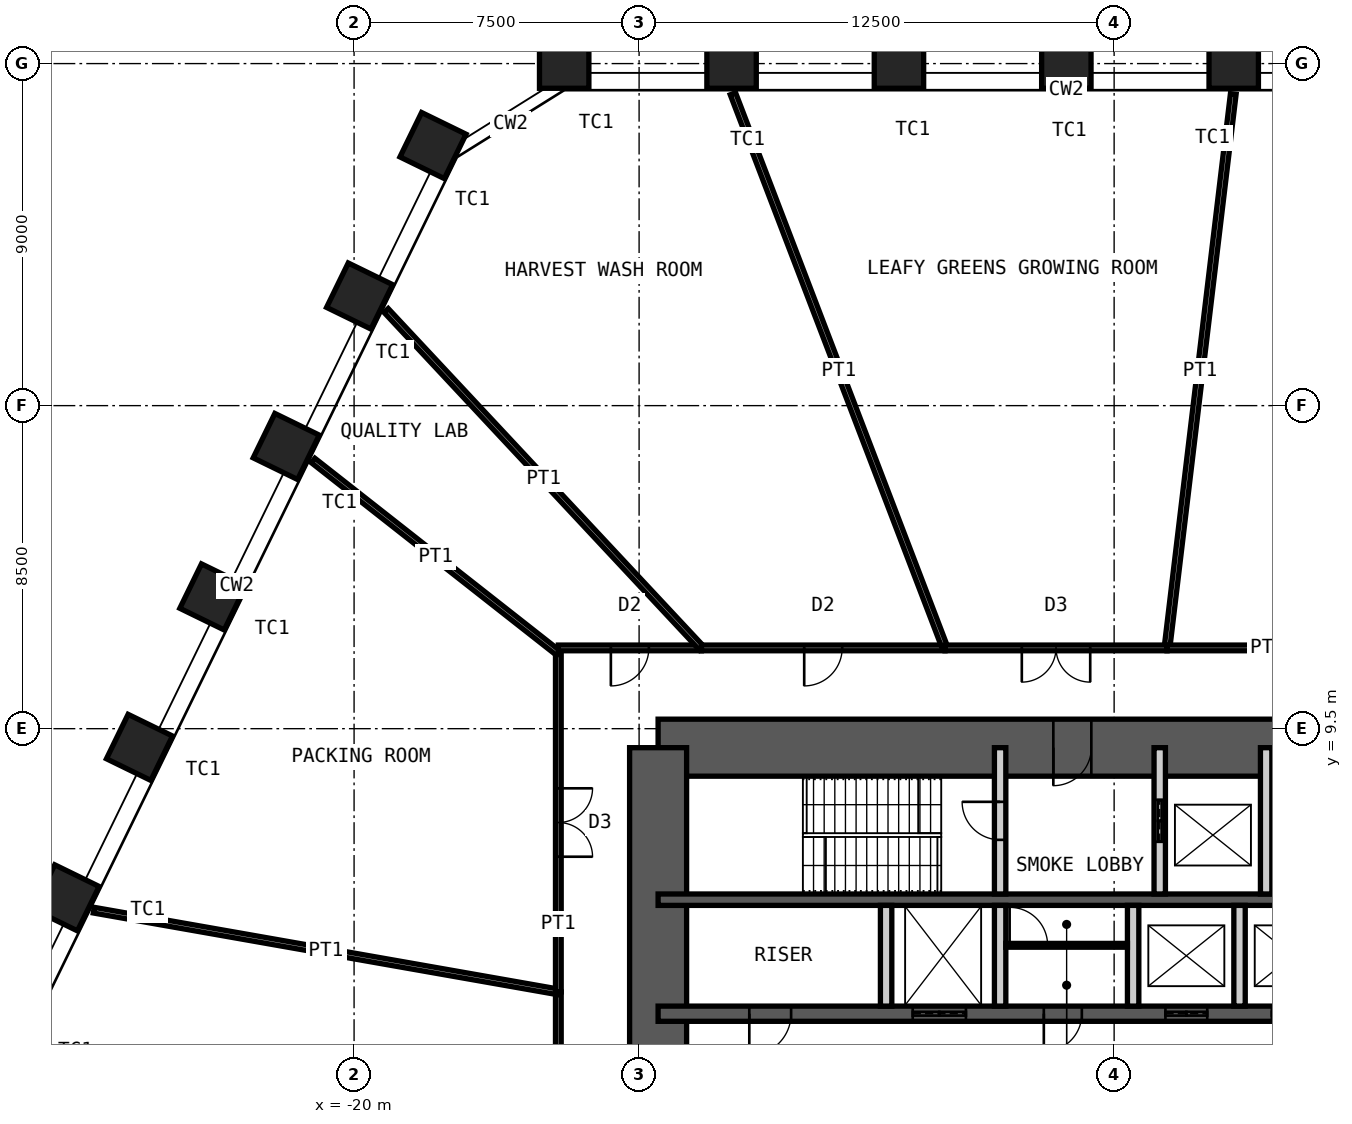
"""IFC4 building model, lengths in metres.
Left out: names, types, materials, properties, quantities, classifications, styles, units other than length and angle.
Written with IfcOpenShell. Run it as: python <this file> out.ifc"""

import sys

from ifc_helpers import new_model, si_unit, direction, frame, frame_2d, origin, origin_2d, place, context, subcontext, project, spatial, rectangle, hollow_rectangle, extrude, element, fill, save


model = new_model("IFC4")
c1 = context("Model", 3, precision=1e-05, world=origin(), true_north=direction((0.0, 1.0)))
c2 = subcontext(c1, "Body", "Model", "MODEL_VIEW")
j1 = project(units=[si_unit("LENGTHUNIT", "METRE"), si_unit("PLANEANGLEUNIT", "RADIAN")], contexts=[c1])
p1 = place(None, origin())
s1 = spatial("IfcSite", under=j1, at=p1, CompositionType="ELEMENT")
p2 = place(p1, origin())
s2 = spatial("IfcBuilding", under=s1, at=p2, CompositionType="ELEMENT")
p3 = place(p2, frame((0.0, 0.0, 47.0)))
s3 = spatial("IfcBuildingStorey", under=s2, at=p3, CompositionType="ELEMENT", Elevation=47.0)
for number, where, z_axis, x_axis in (
    (1, (-14.471, 27.0, 0.0), (0.0, 0.0, 1.0), (-1.0, 0.0, 0.0)),
    (2, (-10.067, 27.0, 0.0), (0.0, 0.0, 1.0), (-1.0, 0.0, 0.0)),
    (3, (-5.662, 27.0, 0.0), (0.0, 0.0, 1.0), (-1.0, 0.0, 0.0)),
    (4, (-1.258, 27.0, 0.0), (0.0, 0.0, 1.0), (-1.0, 0.0, 0.0)),
    (5, (3.147, 27.0, 0.0), (0.0, 0.0, 1.0), (-1.0, 0.0, 0.0)),
    (6, (-27.578, 5.049, 0.0), (0.0, 0.0, 1.0), (-0.438, -0.899, 0.0)),
    (7, (-25.647, 9.008, 0.0), (0.0, 0.0, 1.0), (-0.438, -0.899, 0.0)),
    (8, (-23.716, 12.966, 0.0), (0.0, 0.0, 1.0), (-0.438, -0.899, 0.0)),
    (9, (-21.785, 16.925, 0.0), (0.0, 0.0, 1.0), (-0.438, -0.899, 0.0)),
    (10, (-19.854, 20.884, 0.0), (0.0, 0.0, 1.0), (-0.438, -0.899, 0.0)),
    (11, (-17.924, 24.843, 0.0), (0.0, 0.0, 1.0), (-0.438, -0.899, 0.0)),
):
    element("IfcColumn", number, at=place(p3, frame(where, z_axis=z_axis, x_axis=x_axis)), inside=s3, PredefinedType="COLUMN", context=c2, shape_type="SweptSolid", body=[
        extrude(hollow_rectangle(XDim=1.3, YDim=1.3, WallThickness=0.1, at=origin_2d()), origin(), (0.0, 0.0, 1.0), 5.0),
    ])
p4 = place(p3, frame((-12.0, 9.0, 0.0), z_axis=(0.0, 0.0, 1.0), x_axis=(1.0, 0.0, 0.0)))
e12 = element("IfcWall", 12, at=p4, inside=s3, PredefinedType="SHEAR", context=c2, shape_type="SweptSolid", body=[
    extrude(rectangle(XDim=24.0, YDim=1.5, at=frame_2d((12.0, 0.0))), origin(), (0.0, 0.0, 1.0), 5.0),
])
p5 = place(p4, frame((10.4, 0.0, 0.0)))
e13 = element("IfcOpeningElement", 13, at=p5, cuts=e12, PredefinedType="OPENING", context=c2, shape_type="SweptSolid", body=[
    extrude(rectangle(XDim=1.0, YDim=2.1, at=frame_2d((0.5, 1.05))), frame((0.0, 0.76, 0.0), z_axis=(0.0, -1.0, 0.0), x_axis=(1.0, 0.0, 0.0)), (0.0, 0.0, 1.0), 1.52),
])
p6 = place(p4, frame((17.6, 0.0, 0.0)))
e14 = element("IfcOpeningElement", 14, at=p6, cuts=e12, PredefinedType="OPENING", context=c2, shape_type="SweptSolid", body=[
    extrude(rectangle(XDim=0.9, YDim=2.1, at=frame_2d((0.45, 1.05))), frame((0.0, 0.76, 0.0), z_axis=(0.0, -1.0, 0.0), x_axis=(1.0, 0.0, 0.0)), (0.0, 0.0, 1.0), 1.52),
])
p7 = place(p4, frame((21.9, 0.0, 0.0)))
e15 = element("IfcOpeningElement", 15, at=p7, cuts=e12, PredefinedType="OPENING", context=c2, shape_type="SweptSolid", body=[
    extrude(rectangle(XDim=0.9, YDim=2.1, at=frame_2d((0.45, 1.05))), frame((0.0, 0.76, 0.0), z_axis=(0.0, -1.0, 0.0), x_axis=(1.0, 0.0, 0.0)), (0.0, 0.0, 1.0), 1.52),
])
p8 = place(p3, frame((-12.0, -9.0, 0.0), z_axis=(0.0, 0.0, 1.0), x_axis=(0.0, 1.0, 0.0)))
e16 = element("IfcWall", 16, at=p8, inside=s3, PredefinedType="SHEAR", context=c2, shape_type="SweptSolid", body=[
    extrude(rectangle(XDim=18.0, YDim=1.5, at=frame_2d((9.0, 0.0))), origin(), (0.0, 0.0, 1.0), 5.0),
])
p9 = place(p8, frame((8.1, 0.0, 0.0)))
e17 = element("IfcOpeningElement", 17, at=p9, cuts=e16, PredefinedType="OPENING", context=c2, shape_type="SweptSolid", body=[
    extrude(rectangle(XDim=1.8, YDim=2.1, at=frame_2d((0.9, 1.05))), frame((0.0, 0.76, 0.0), z_axis=(0.0, -1.0, 0.0), x_axis=(1.0, 0.0, 0.0)), (0.0, 0.0, 1.0), 1.52),
])
p10 = place(p3, frame((-12.0, 5.0, 0.0), z_axis=(0.0, 0.0, 1.0), x_axis=(1.0, 0.0, 0.0)))
e18 = element("IfcWall", 18, at=p10, inside=s3, PredefinedType="SHEAR", context=c2, shape_type="SweptSolid", body=[
    extrude(rectangle(XDim=24.0, YDim=0.3, at=frame_2d((12.0, 0.0))), origin(), (0.0, 0.0, 1.0), 5.0),
])
p11 = place(p3, frame((-12.0, 2.0, 0.0), z_axis=(0.0, 0.0, 1.0), x_axis=(1.0, 0.0, 0.0)))
e19 = element("IfcWall", 19, at=p11, inside=s3, PredefinedType="SHEAR", context=c2, shape_type="SweptSolid", body=[
    extrude(rectangle(XDim=24.0, YDim=0.4, at=frame_2d((12.0, 0.0))), origin(), (0.0, 0.0, 1.0), 5.0),
])
p12 = place(p11, frame((2.4, 0.0, 0.0)))
e20 = element("IfcOpeningElement", 20, at=p12, cuts=e19, PredefinedType="OPENING", context=c2, shape_type="SweptSolid", body=[
    extrude(rectangle(XDim=1.1, YDim=2.1, at=frame_2d((0.55, 1.05))), frame((0.0, 0.21, 0.0), z_axis=(0.0, -1.0, 0.0), x_axis=(1.0, 0.0, 0.0)), (0.0, 0.0, 1.0), 0.42),
])
p13 = place(p11, frame((22.0, 0.0, 0.0)))
e21 = element("IfcOpeningElement", 21, at=p13, cuts=e19, PredefinedType="OPENING", context=c2, shape_type="SweptSolid", body=[
    extrude(rectangle(XDim=1.1, YDim=2.1, at=frame_2d((0.55, 1.05))), frame((0.0, 0.21, 0.0), z_axis=(0.0, -1.0, 0.0), x_axis=(1.0, 0.0, 0.0)), (0.0, 0.0, 1.0), 0.42),
])
p14 = place(p11, frame((10.15, 0.0, 0.0)))
e22 = element("IfcOpeningElement", 22, at=p14, cuts=e19, PredefinedType="OPENING", context=c2, shape_type="SweptSolid", body=[
    extrude(rectangle(XDim=1.0, YDim=2.1, at=frame_2d((0.5, 1.05))), frame((0.0, 0.21, 0.0), z_axis=(0.0, -1.0, 0.0), x_axis=(1.0, 0.0, 0.0)), (0.0, 0.0, 1.0), 0.42),
])
p15 = place(p11, frame((6.7, 0.0, 0.0)))
e23 = element("IfcOpeningElement", 23, at=p15, cuts=e19, PredefinedType="OPENING", context=c2, shape_type="SweptSolid", body=[
    extrude(rectangle(XDim=1.4, YDim=2.4, at=frame_2d((0.7, 1.2))), frame((0.0, 0.21, 0.0), z_axis=(0.0, -1.0, 0.0), x_axis=(1.0, 0.0, 0.0)), (0.0, 0.0, 1.0), 0.42),
])
p16 = place(p11, frame((13.35, 0.0, 0.0)))
e24 = element("IfcOpeningElement", 24, at=p16, cuts=e19, PredefinedType="OPENING", context=c2, shape_type="SweptSolid", body=[
    extrude(rectangle(XDim=1.1, YDim=2.4, at=frame_2d((0.55, 1.2))), frame((0.0, 0.21, 0.0), z_axis=(0.0, -1.0, 0.0), x_axis=(1.0, 0.0, 0.0)), (0.0, 0.0, 1.0), 0.42),
])
p17 = place(p11, frame((16.15, 0.0, 0.0)))
e25 = element("IfcOpeningElement", 25, at=p17, cuts=e19, PredefinedType="OPENING", context=c2, shape_type="SweptSolid", body=[
    extrude(rectangle(XDim=1.1, YDim=2.4, at=frame_2d((0.55, 1.2))), frame((0.0, 0.21, 0.0), z_axis=(0.0, -1.0, 0.0), x_axis=(1.0, 0.0, 0.0)), (0.0, 0.0, 1.0), 0.42),
])
p18 = place(p11, frame((18.95, 0.0, 0.0)))
e26 = element("IfcOpeningElement", 26, at=p18, cuts=e19, PredefinedType="OPENING", context=c2, shape_type="SweptSolid", body=[
    extrude(rectangle(XDim=1.1, YDim=2.4, at=frame_2d((0.55, 1.2))), frame((0.0, 0.21, 0.0), z_axis=(0.0, -1.0, 0.0), x_axis=(1.0, 0.0, 0.0)), (0.0, 0.0, 1.0), 0.42),
])
p19 = place(p3, frame((-3.0, 5.15, 0.0), z_axis=(0.0, 0.0, 1.0), x_axis=(0.0, 1.0, 0.0)))
e27 = element("IfcWall", 27, at=p19, inside=s3, PredefinedType="PARTITIONING", context=c2, shape_type="SweptSolid", body=[
    extrude(rectangle(XDim=3.85, YDim=0.3, at=frame_2d((1.925, 0.0))), origin(), (0.0, 0.0, 1.0), 4.78),
])
p20 = place(p19, frame((1.425, 0.0, 0.0)))
e28 = element("IfcOpeningElement", 28, at=p20, cuts=e27, PredefinedType="OPENING", context=c2, shape_type="SweptSolid", body=[
    extrude(rectangle(XDim=1.0, YDim=2.1, at=frame_2d((0.5, 1.05))), frame((0.0, 0.16, 0.0), z_axis=(0.0, -1.0, 0.0), x_axis=(1.0, 0.0, 0.0)), (0.0, 0.0, 1.0), 0.32),
])
p21 = place(p3, frame((1.2, 5.15, 0.0), z_axis=(0.0, 0.0, 1.0), x_axis=(0.0, 1.0, 0.0)))
e29 = element("IfcWall", 29, at=p21, inside=s3, PredefinedType="PARTITIONING", context=c2, shape_type="SweptSolid", body=[
    extrude(rectangle(XDim=3.85, YDim=0.3, at=frame_2d((1.925, 0.0))), origin(), (0.0, 0.0, 1.0), 4.78),
])
p22 = place(p21, frame((1.375, 0.0, 0.0)))
e30 = element("IfcOpeningElement", 30, at=p22, cuts=e29, PredefinedType="OPENING", context=c2, shape_type="SweptSolid", body=[
    extrude(rectangle(XDim=1.1, YDim=2.4, at=frame_2d((0.55, 1.2))), frame((0.0, 0.16, 0.0), z_axis=(0.0, -1.0, 0.0), x_axis=(1.0, 0.0, 0.0)), (0.0, 0.0, 1.0), 0.32),
])
p23 = place(p3, frame((4.0, 5.15, 0.0), z_axis=(0.0, 0.0, 1.0), x_axis=(0.0, 1.0, 0.0)))
e31 = element("IfcWall", 31, at=p23, inside=s3, PredefinedType="PARTITIONING", context=c2, shape_type="SweptSolid", body=[
    extrude(rectangle(XDim=3.85, YDim=0.3, at=frame_2d((1.925, 0.0))), origin(), (0.0, 0.0, 1.0), 4.78),
])
for number, where, z_axis, x_axis in (
    (32, (-6.0, 2.2, 0.0), (0.0, 0.0, 1.0), (0.0, 1.0, 0.0)),
    (33, (-3.0, 2.2, 0.0), (0.0, 0.0, 1.0), (0.0, 1.0, 0.0)),
    (34, (0.5, 2.2, 0.0), (0.0, 0.0, 1.0), (0.0, 1.0, 0.0)),
    (35, (3.3, 2.2, 0.0), (0.0, 0.0, 1.0), (0.0, 1.0, 0.0)),
):
    element("IfcWall", number, at=place(p3, frame(where, z_axis=z_axis, x_axis=x_axis)), inside=s3, PredefinedType="PARTITIONING", context=c2, shape_type="SweptSolid", body=[
        extrude(rectangle(XDim=2.65, YDim=0.3, at=frame_2d((1.325, 0.0))), origin(), (0.0, 0.0, 1.0), 4.78),
    ])
p24 = place(p3, frame((-2.85, 3.8, 0.0), z_axis=(0.0, 0.0, 1.0), x_axis=(1.0, 0.0, 0.0)))
e36 = element("IfcWall", 36, at=p24, inside=s3, PredefinedType="PARTITIONING", context=c2, shape_type="SweptSolid", body=[
    extrude(rectangle(XDim=3.2, YDim=0.1, at=frame_2d((1.6, 0.0))), origin(), (0.0, 0.0, 1.0), 4.78),
])
p25 = place(p24, frame((0.1, 0.0, 0.0)))
e37 = element("IfcOpeningElement", 37, at=p25, cuts=e36, PredefinedType="OPENING", context=c2, shape_type="SweptSolid", body=[
    extrude(rectangle(XDim=1.0, YDim=2.4, at=frame_2d((0.5, 1.2))), frame((0.0, 0.06, 0.0), z_axis=(0.0, -1.0, 0.0), x_axis=(1.0, 0.0, 0.0)), (0.0, 0.0, 1.0), 0.12),
])
p26 = place(p3, frame((3.135, 26.201, 0.0), z_axis=(0.0, 0.0, 1.0), x_axis=(-0.118796980211, -0.992918565388, 0.0)))
e38 = element("IfcWall", 38, at=p26, inside=s3, PredefinedType="PARTITIONING", context=c2, shape_type="SweptSolid", body=[
    extrude(rectangle(XDim=14.68, YDim=0.15, at=frame_2d((7.34, 0.0))), origin(), (0.0, 0.0, 1.0), 3.7),
])
p27 = place(p3, frame((1.391, 11.625, 0.0), z_axis=(0.0, 0.0, 1.0), x_axis=(1.0, 0.0, 0.0)))
e39 = element("IfcWall", 39, at=p27, inside=s3, PredefinedType="PARTITIONING", context=c2, shape_type="SweptSolid", body=[
    extrude(rectangle(XDim=13.234, YDim=0.15, at=frame_2d((6.617, 0.0))), origin(), (0.0, 0.0, 1.0), 4.8),
])
p28 = place(p27, frame((5.717, 0.0, 0.0)))
e40 = element("IfcOpeningElement", 40, at=p28, cuts=e39, PredefinedType="OPENING", context=c2, shape_type="SweptSolid", body=[
    extrude(rectangle(XDim=1.8, YDim=2.4, at=frame_2d((0.9, 1.2))), frame((0.0, 0.085, 0.0), z_axis=(0.0, -1.0, 0.0), x_axis=(1.0, 0.0, 0.0)), (0.0, 0.0, 1.0), 0.17),
])
p29 = place(p3, frame((-14.625, -3.641, 0.0), z_axis=(0.0, 0.0, 1.0), x_axis=(0.0, 1.0, 0.0)))
e41 = element("IfcWall", 41, at=p29, inside=s3, PredefinedType="PARTITIONING", context=c2, shape_type="SweptSolid", body=[
    extrude(rectangle(XDim=6.214, YDim=0.15, at=frame_2d((3.107, 0.0))), origin(), (0.0, 0.0, 1.0), 4.8),
])
p30 = place(p29, frame((2.607, 0.0, 0.0)))
e42 = element("IfcOpeningElement", 42, at=p30, cuts=e41, PredefinedType="OPENING", context=c2, shape_type="SweptSolid", body=[
    extrude(rectangle(XDim=1.0, YDim=2.4, at=frame_2d((0.5, 1.2))), frame((0.0, 0.085, 0.0), z_axis=(0.0, -1.0, 0.0), x_axis=(1.0, 0.0, 0.0)), (0.0, 0.0, 1.0), 0.17),
])
p31 = place(p3, frame((-26.85, 4.725, 0.0), z_axis=(0.0, 0.0, 1.0), x_axis=(0.984869569104, -0.173297235559, 0.0)))
e43 = element("IfcWall", 43, at=p31, inside=s3, PredefinedType="PARTITIONING", context=c2, shape_type="SweptSolid", body=[
    extrude(rectangle(XDim=12.413, YDim=0.15, at=frame_2d((6.207, 0.0))), origin(), (0.0, 0.0, 1.0), 3.7),
])
p32 = place(p3, frame((-14.625, 2.573, 0.0), z_axis=(0.0, 0.0, 1.0), x_axis=(0.0, 1.0, 0.0)))
e44 = element("IfcWall", 44, at=p32, inside=s3, PredefinedType="PARTITIONING", context=c2, shape_type="SweptSolid", body=[
    extrude(rectangle(XDim=8.915, YDim=0.15, at=frame_2d((4.457, 0.0))), origin(), (0.0, 0.0, 1.0), 4.8),
])
p33 = place(p32, frame((3.557, 0.0, 0.0)))
e45 = element("IfcOpeningElement", 45, at=p33, cuts=e44, PredefinedType="OPENING", context=c2, shape_type="SweptSolid", body=[
    extrude(rectangle(XDim=1.8, YDim=2.4, at=frame_2d((0.9, 1.2))), frame((0.0, 0.085, 0.0), z_axis=(0.0, -1.0, 0.0), x_axis=(1.0, 0.0, 0.0)), (0.0, 0.0, 1.0), 0.17),
])
p34 = place(p3, frame((-21.077, 16.557, 0.0), z_axis=(0.0, 0.0, 1.0), x_axis=(0.786385446389, -0.617736132752, 0.0)))
e46 = element("IfcWall", 46, at=p34, inside=s3, PredefinedType="PARTITIONING", context=c2, shape_type="SweptSolid", body=[
    extrude(rectangle(XDim=8.205, YDim=0.15, at=frame_2d((4.103, 0.0))), origin(), (0.0, 0.0, 1.0), 3.7),
])
p35 = place(p3, frame((-14.625, 11.625, 0.0), z_axis=(0.0, 0.0, 1.0), x_axis=(1.0, 0.0, 0.0)))
e47 = element("IfcWall", 47, at=p35, inside=s3, PredefinedType="PARTITIONING", context=c2, shape_type="SweptSolid", body=[
    extrude(rectangle(XDim=3.764, YDim=0.15, at=frame_2d((1.882, 0.0))), origin(), (0.0, 0.0, 1.0), 4.8),
])
p36 = place(p35, frame((1.382, 0.0, 0.0)))
e48 = element("IfcOpeningElement", 48, at=p36, cuts=e47, PredefinedType="OPENING", context=c2, shape_type="SweptSolid", body=[
    extrude(rectangle(XDim=1.0, YDim=2.4, at=frame_2d((0.5, 1.2))), frame((0.0, 0.085, 0.0), z_axis=(0.0, -1.0, 0.0), x_axis=(1.0, 0.0, 0.0)), (0.0, 0.0, 1.0), 0.17),
])
p37 = place(p3, frame((-19.157, 20.504, 0.0), z_axis=(0.0, 0.0, 1.0), x_axis=(0.682689688298, -0.73070841619, 0.0)))
e49 = element("IfcWall", 49, at=p37, inside=s3, PredefinedType="PARTITIONING", context=c2, shape_type="SweptSolid", body=[
    extrude(rectangle(XDim=12.151, YDim=0.15, at=frame_2d((6.076, 0.0))), origin(), (0.0, 0.0, 1.0), 3.7),
])
p38 = place(p3, frame((-10.861, 11.625, 0.0), z_axis=(0.0, 0.0, 1.0), x_axis=(1.0, 0.0, 0.0)))
e50 = element("IfcWall", 50, at=p38, inside=s3, PredefinedType="PARTITIONING", context=c2, shape_type="SweptSolid", body=[
    extrude(rectangle(XDim=6.412, YDim=0.15, at=frame_2d((3.206, 0.0))), origin(), (0.0, 0.0, 1.0), 4.8),
])
p39 = place(p38, frame((2.706, 0.0, 0.0)))
e51 = element("IfcOpeningElement", 51, at=p39, cuts=e50, PredefinedType="OPENING", context=c2, shape_type="SweptSolid", body=[
    extrude(rectangle(XDim=1.0, YDim=2.4, at=frame_2d((0.5, 1.2))), frame((0.0, 0.085, 0.0), z_axis=(0.0, -1.0, 0.0), x_axis=(1.0, 0.0, 0.0)), (0.0, 0.0, 1.0), 0.17),
])
p40 = place(p3, frame((-10.031, 26.207, 0.0), z_axis=(0.0, 0.0, 1.0), x_axis=(0.35747288505, -0.933923517454, 0.0)))
e52 = element("IfcWall", 52, at=p40, inside=s3, PredefinedType="PARTITIONING", context=c2, shape_type="SweptSolid", body=[
    extrude(rectangle(XDim=15.613, YDim=0.15, at=frame_2d((7.807, 0.0))), origin(), (0.0, 0.0, 1.0), 3.7),
])
p41 = place(p3, frame((-4.45, 11.625, 0.0), z_axis=(0.0, 0.0, 1.0), x_axis=(1.0, 0.0, 0.0)))
e53 = element("IfcWall", 53, at=p41, inside=s3, PredefinedType="PARTITIONING", context=c2, shape_type="SweptSolid", body=[
    extrude(rectangle(XDim=5.841, YDim=0.15, at=frame_2d((2.92, 0.0))), origin(), (0.0, 0.0, 1.0), 4.8),
])
p42 = place(p41, frame((2.02, 0.0, 0.0)))
e54 = element("IfcOpeningElement", 54, at=p42, cuts=e53, PredefinedType="OPENING", context=c2, shape_type="SweptSolid", body=[
    extrude(rectangle(XDim=1.8, YDim=2.4, at=frame_2d((0.9, 1.2))), frame((0.0, 0.085, 0.0), z_axis=(0.0, -1.0, 0.0), x_axis=(1.0, 0.0, 0.0)), (0.0, 0.0, 1.0), 0.17),
])
p43 = place(p5, origin())
e55 = element("IfcDoor", 55, at=p43, inside=s3, OperationType="SINGLE_SWING_LEFT", PredefinedType="DOOR", context=c2, shape_type="SweptSolid", body=[
    extrude(rectangle(XDim=1.0, YDim=2.1, at=frame_2d((0.5, 1.05))), frame((0.0, 0.025, 0.0), z_axis=(0.0, -1.0, 0.0), x_axis=(1.0, 0.0, 0.0)), (0.0, 0.0, 1.0), 0.05),
])
fill(e13, e55)
p44 = place(p20, origin())
e56 = element("IfcDoor", 56, at=p44, inside=s3, OperationType="SINGLE_SWING_LEFT", PredefinedType="DOOR", context=c2, shape_type="SweptSolid", body=[
    extrude(rectangle(XDim=1.0, YDim=2.1, at=frame_2d((0.5, 1.05))), frame((0.0, 0.025, 0.0), z_axis=(0.0, -1.0, 0.0), x_axis=(1.0, 0.0, 0.0)), (0.0, 0.0, 1.0), 0.05),
])
fill(e28, e56)
p45 = place(p12, origin())
e57 = element("IfcDoor", 57, at=p45, inside=s3, OperationType="SINGLE_SWING_LEFT", PredefinedType="DOOR", context=c2, shape_type="SweptSolid", body=[
    extrude(rectangle(XDim=1.1, YDim=2.1, at=frame_2d((0.55, 1.05))), frame((0.0, 0.025, 0.0), z_axis=(0.0, -1.0, 0.0), x_axis=(1.0, 0.0, 0.0)), (0.0, 0.0, 1.0), 0.05),
])
fill(e20, e57)
p46 = place(p14, origin())
e58 = element("IfcDoor", 58, at=p46, inside=s3, OperationType="SINGLE_SWING_LEFT", PredefinedType="DOOR", context=c2, shape_type="SweptSolid", body=[
    extrude(rectangle(XDim=1.0, YDim=2.1, at=frame_2d((0.5, 1.05))), frame((0.0, 0.025, 0.0), z_axis=(0.0, -1.0, 0.0), x_axis=(1.0, 0.0, 0.0)), (0.0, 0.0, 1.0), 0.05),
])
fill(e22, e58)
p47 = place(p22, origin())
e59 = element("IfcDoor", 59, at=p47, inside=s3, OperationType="DOUBLE_DOOR_SLIDING", PredefinedType="DOOR", context=c2, shape_type="SweptSolid", body=[
    extrude(rectangle(XDim=1.1, YDim=2.4, at=frame_2d((0.55, 1.2))), frame((0.0, 0.025, 0.0), z_axis=(0.0, -1.0, 0.0), x_axis=(1.0, 0.0, 0.0)), (0.0, 0.0, 1.0), 0.05),
])
fill(e30, e59)
p48 = place(p15, origin())
e60 = element("IfcDoor", 60, at=p48, inside=s3, OperationType="DOUBLE_DOOR_SLIDING", PredefinedType="DOOR", context=c2, shape_type="SweptSolid", body=[
    extrude(rectangle(XDim=1.4, YDim=2.4, at=frame_2d((0.7, 1.2))), frame((0.0, 0.025, 0.0), z_axis=(0.0, -1.0, 0.0), x_axis=(1.0, 0.0, 0.0)), (0.0, 0.0, 1.0), 0.05),
])
fill(e23, e60)
p49 = place(p16, origin())
e61 = element("IfcDoor", 61, at=p49, inside=s3, OperationType="DOUBLE_DOOR_SLIDING", PredefinedType="DOOR", context=c2, shape_type="SweptSolid", body=[
    extrude(rectangle(XDim=1.1, YDim=2.4, at=frame_2d((0.55, 1.2))), frame((0.0, 0.025, 0.0), z_axis=(0.0, -1.0, 0.0), x_axis=(1.0, 0.0, 0.0)), (0.0, 0.0, 1.0), 0.05),
])
fill(e24, e61)
p50 = place(p25, origin())
e62 = element("IfcDoor", 62, at=p50, inside=s3, OperationType="SINGLE_SWING_RIGHT", PredefinedType="DOOR", context=c2, shape_type="SweptSolid", body=[
    extrude(rectangle(XDim=1.0, YDim=2.4, at=frame_2d((0.5, 1.2))), frame((0.0, 0.025, 0.0), z_axis=(0.0, -1.0, 0.0), x_axis=(1.0, 0.0, 0.0)), (0.0, 0.0, 1.0), 0.05),
])
fill(e37, e62)
p51 = place(p33, origin())
e63 = element("IfcDoor", 63, at=p51, inside=s3, OperationType="DOUBLE_DOOR_DOUBLE_SWING", PredefinedType="DOOR", context=c2, shape_type="SweptSolid", body=[
    extrude(rectangle(XDim=1.8, YDim=2.4, at=frame_2d((0.9, 1.2))), frame((0.0, 0.025, 0.0), z_axis=(0.0, -1.0, 0.0), x_axis=(1.0, 0.0, 0.0)), (0.0, 0.0, 1.0), 0.05),
])
fill(e45, e63)
p52 = place(p36, origin())
e64 = element("IfcDoor", 64, at=p52, inside=s3, OperationType="SINGLE_SWING_LEFT", PredefinedType="DOOR", context=c2, shape_type="SweptSolid", body=[
    extrude(rectangle(XDim=1.0, YDim=2.4, at=frame_2d((0.5, 1.2))), frame((0.0, 0.025, 0.0), z_axis=(0.0, -1.0, 0.0), x_axis=(1.0, 0.0, 0.0)), (0.0, 0.0, 1.0), 0.05),
])
fill(e48, e64)
p53 = place(p39, origin())
e65 = element("IfcDoor", 65, at=p53, inside=s3, OperationType="SINGLE_SWING_LEFT", PredefinedType="DOOR", context=c2, shape_type="SweptSolid", body=[
    extrude(rectangle(XDim=1.0, YDim=2.4, at=frame_2d((0.5, 1.2))), frame((0.0, 0.025, 0.0), z_axis=(0.0, -1.0, 0.0), x_axis=(1.0, 0.0, 0.0)), (0.0, 0.0, 1.0), 0.05),
])
fill(e51, e65)
p54 = place(p42, origin())
e66 = element("IfcDoor", 66, at=p54, inside=s3, OperationType="DOUBLE_DOOR_DOUBLE_SWING", PredefinedType="DOOR", context=c2, shape_type="SweptSolid", body=[
    extrude(rectangle(XDim=1.8, YDim=2.4, at=frame_2d((0.9, 1.2))), frame((0.0, 0.025, 0.0), z_axis=(0.0, -1.0, 0.0), x_axis=(1.0, 0.0, 0.0)), (0.0, 0.0, 1.0), 0.05),
])
fill(e54, e66)
save(model, sys.argv[1])
